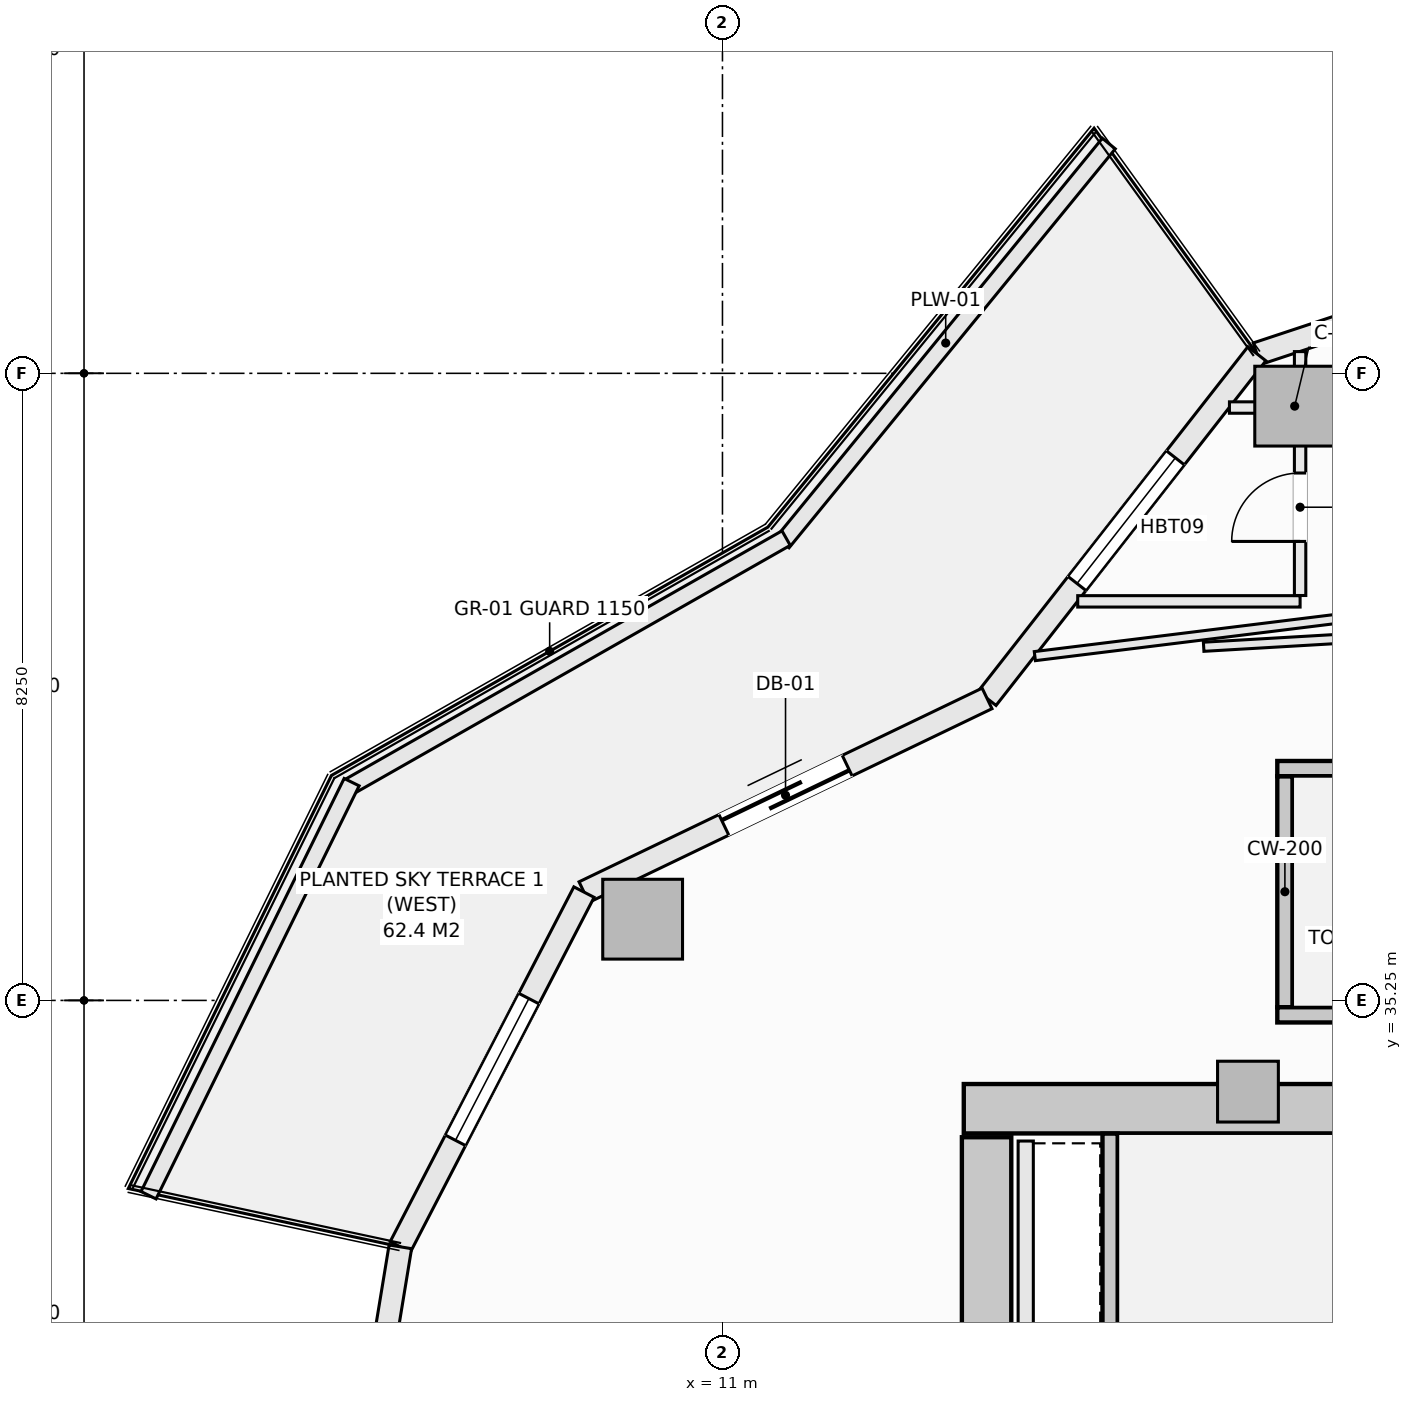
"""IFC4 building model, lengths in metres.
Left out: names, types, materials, properties, quantities, classifications, styles, units other than length and angle.
Written with IfcOpenShell. Run it as: python <this file> out.ifc"""

import sys

from ifc_helpers import new_model, si_unit, direction, frame, frame_2d, origin, origin_2d, place, context, subcontext, project, spatial, rectangle, extrude, element, fill, save


model = new_model("IFC4")
c1 = context("Model", 3, precision=1e-05, world=origin(), true_north=direction((0.0, 1.0)))
c2 = subcontext(c1, "Body", "Model", "MODEL_VIEW")
j1 = project(units=[si_unit("LENGTHUNIT", "METRE"), si_unit("PLANEANGLEUNIT", "RADIAN")], contexts=[c1])
p1 = place(None, origin())
s1 = spatial("IfcSite", under=j1, at=p1, CompositionType="ELEMENT")
p2 = place(p1, origin())
s2 = spatial("IfcBuilding", under=s1, at=p2, CompositionType="ELEMENT")
p3 = place(p2, frame((0.0, 0.0, 135.9)))
s3 = spatial("IfcBuildingStorey", under=s2, at=p3, CompositionType="ELEMENT", Elevation=135.9)
p4 = place(p3, frame((14.175, 33.825, -0.27), z_axis=(0.0, 0.0, 1.0), x_axis=(1.0, 0.0, 0.0)))
e1 = element("IfcWall", 1, at=p4, inside=s3, PredefinedType="SHEAR", context=c2, shape_type="SweptSolid", body=[
    extrude(rectangle(XDim=13.65, YDim=0.65, at=frame_2d((6.825, 0.0))), origin(), (0.0, 0.0, 1.0), 3.4),
])
p5 = place(p3, frame((14.475, 20.55, -0.27), z_axis=(0.0, 0.0, 1.0), x_axis=(0.0, 1.0, 0.0)))
e2 = element("IfcWall", 2, at=p5, inside=s3, PredefinedType="SHEAR", context=c2, shape_type="SweptSolid", body=[
    extrude(rectangle(XDim=12.9, YDim=0.65, at=frame_2d((6.45, 0.0))), origin(), (0.0, 0.0, 1.0), 3.4),
])
for number, where, z_axis, x_axis in (
    (3, (18.529, 43.068, -0.27), (0.0, 0.0, 1.0), (1.0, 0.0, 0.0)),
    (4, (9.95, 36.319, -0.27), (0.0, 0.0, 1.0), (1.0, 0.0, 0.0)),
):
    element("IfcColumn", number, at=place(p3, frame(where, z_axis=z_axis, x_axis=x_axis)), inside=s3, PredefinedType="COLUMN", context=c2, shape_type="SweptSolid", body=[
        extrude(rectangle(XDim=1.05, YDim=1.05, at=origin_2d()), origin(), (0.0, 0.0, 1.0), 3.4),
    ])
p6 = place(p3, frame((17.914, 34.05, -0.27), z_axis=(0.0, 0.0, 1.0), x_axis=(1.0, 0.0, 0.0)))
e5 = element("IfcColumn", 5, at=p6, inside=s3, PredefinedType="PILASTER", context=c2, shape_type="SweptSolid", body=[
    extrude(rectangle(XDim=0.8, YDim=0.8, at=origin_2d()), origin(), (0.0, 0.0, 1.0), 3.4),
])
p7 = place(p3, frame((18.031, 43.758, 0.0), z_axis=(0.0, 0.0, 1.0), x_axis=(0.949238009374, 0.314558741032, 0.0)))
e6 = element("IfcWall", 6, at=p7, inside=s3, PredefinedType="SOLIDWALL", context=c2, shape_type="SweptSolid", body=[
    extrude(rectangle(XDim=6.146, YDim=0.3, at=frame_2d((3.073, 0.0))), origin(), (0.0, 0.0, 1.0), 2.653),
])
p8 = place(p7, frame((2.023, 0.0, 0.74)))
e7 = element("IfcOpeningElement", 7, at=p8, cuts=e6, PredefinedType="OPENING", context=c2, shape_type="SweptSolid", body=[
    extrude(rectangle(XDim=2.1, YDim=1.7, at=frame_2d((1.05, 0.85))), frame((0.0, 0.16, 0.0), z_axis=(0.0, -1.0, 0.0), x_axis=(1.0, 0.0, 0.0)), (0.0, 0.0, 1.0), 0.32),
])
p9 = place(p3, frame((14.481, 39.223, 0.0), z_axis=(0.0, 0.0, 1.0), x_axis=(0.616435134162, 0.787405693001, 0.0)))
e8 = element("IfcWall", 8, at=p9, inside=s3, PredefinedType="SOLIDWALL", context=c2, shape_type="SweptSolid", body=[
    extrude(rectangle(XDim=5.759, YDim=0.3, at=frame_2d((2.879, 0.0))), origin(), (0.0, 0.0, 1.0), 2.653),
])
p10 = place(p9, frame((1.92, 0.0, 0.74)))
e9 = element("IfcOpeningElement", 9, at=p10, cuts=e8, PredefinedType="OPENING", context=c2, shape_type="SweptSolid", body=[
    extrude(rectangle(XDim=2.1, YDim=1.7, at=frame_2d((1.05, 0.85))), frame((0.0, 0.16, 0.0), z_axis=(0.0, -1.0, 0.0), x_axis=(1.0, 0.0, 0.0)), (0.0, 0.0, 1.0), 0.32),
])
p11 = place(p3, frame((9.178, 36.675, 0.0), z_axis=(0.0, 0.0, 1.0), x_axis=(0.901370184739, 0.433049408339, 0.0)))
e10 = element("IfcWall", 10, at=p11, inside=s3, PredefinedType="SOLIDWALL", context=c2, shape_type="SweptSolid", body=[
    extrude(rectangle(XDim=5.884, YDim=0.3, at=frame_2d((2.942, 0.0))), origin(), (0.0, 0.0, 1.0), 2.653),
])
p12 = place(p11, frame((2.042, 0.0, 0.0)))
e11 = element("IfcOpeningElement", 11, at=p12, cuts=e10, PredefinedType="OPENING", context=c2, shape_type="SweptSolid", body=[
    extrude(rectangle(XDim=1.8, YDim=2.25, at=frame_2d((0.9, 1.125))), frame((0.0, 0.16, 0.0), z_axis=(0.0, -1.0, 0.0), x_axis=(1.0, 0.0, 0.0)), (0.0, 0.0, 1.0), 0.32),
])
p13 = place(p3, frame((6.762, 32.008, 0.0), z_axis=(0.0, 0.0, 1.0), x_axis=(0.459767899643, 0.888039119892, 0.0)))
e12 = element("IfcWall", 12, at=p13, inside=s3, PredefinedType="SOLIDWALL", context=c2, shape_type="SweptSolid", body=[
    extrude(rectangle(XDim=5.255, YDim=0.3, at=frame_2d((2.628, 0.0))), origin(), (0.0, 0.0, 1.0), 2.653),
])
p14 = place(p13, frame((1.578, 0.0, 0.74)))
e13 = element("IfcOpeningElement", 13, at=p14, cuts=e12, PredefinedType="OPENING", context=c2, shape_type="SweptSolid", body=[
    extrude(rectangle(XDim=2.1, YDim=1.7, at=frame_2d((1.05, 0.85))), frame((0.0, 0.16, 0.0), z_axis=(0.0, -1.0, 0.0), x_axis=(1.0, 0.0, 0.0)), (0.0, 0.0, 1.0), 0.32),
])
p15 = place(p3, frame((5.938, 27.0, 0.0), z_axis=(0.0, 0.0, 1.0), x_axis=(0.162393944769, 0.986726003864, 0.0)))
e14 = element("IfcWall", 14, at=p15, inside=s3, PredefinedType="SOLIDWALL", context=c2, shape_type="SweptSolid", body=[
    extrude(rectangle(XDim=5.075, YDim=0.3, at=frame_2d((2.538, 0.0))), origin(), (0.0, 0.0, 1.0), 2.653),
])
p16 = place(p15, frame((1.488, 0.0, 0.74)))
e15 = element("IfcOpeningElement", 15, at=p16, cuts=e14, PredefinedType="OPENING", context=c2, shape_type="SweptSolid", body=[
    extrude(rectangle(XDim=2.1, YDim=1.7, at=frame_2d((1.05, 0.85))), frame((0.0, 0.16, 0.0), z_axis=(0.0, -1.0, 0.0), x_axis=(1.0, 0.0, 0.0)), (0.0, 0.0, 1.0), 0.32),
])
p17 = place(p3, frame((11.791, 41.274, 0.0), z_axis=(0.0, 0.0, 1.0), x_axis=(0.633024046468, 0.774132131224, 0.0)))
e16 = element("IfcWall", 16, at=p17, inside=s3, PredefinedType="PARAPET", context=c2, shape_type="SweptSolid", body=[
    extrude(rectangle(XDim=6.781, YDim=0.22, at=frame_2d((3.39, 0.0))), origin(), (0.0, 0.0, 1.0), 0.52),
])
p18 = place(p3, frame((6.095, 38.066, 0.0), z_axis=(0.0, 0.0, 1.0), x_axis=(0.869187658335, 0.494482370361, 0.0)))
e17 = element("IfcWall", 17, at=p18, inside=s3, PredefinedType="PARAPET", context=c2, shape_type="SweptSolid", body=[
    extrude(rectangle(XDim=6.606, YDim=0.22, at=frame_2d((3.303, 0.0))), origin(), (0.0, 0.0, 1.0), 0.52),
])
p19 = place(p3, frame((3.449, 32.687, 0.0), z_axis=(0.0, 0.0, 1.0), x_axis=(0.441269631716, 0.897374566235, 0.0)))
e18 = element("IfcWall", 18, at=p19, inside=s3, PredefinedType="PARAPET", context=c2, shape_type="SweptSolid", body=[
    extrude(rectangle(XDim=6.056, YDim=0.22, at=frame_2d((3.028, 0.0))), origin(), (0.0, 0.0, 1.0), 0.52),
])
p20 = place(p3, frame((16.1, 30.462, -0.27), z_axis=(0.0, 0.0, 1.0), x_axis=(0.0, 1.0, 0.0)))
e19 = element("IfcWall", 19, at=p20, inside=s3, PredefinedType="SHEAR", context=c2, shape_type="SweptSolid", body=[
    extrude(rectangle(XDim=3.036, YDim=0.2, at=frame_2d((1.518, 0.0))), origin(), (0.0, 0.0, 1.0), 3.4),
])
p21 = place(p3, frame((18.4, 35.16, -0.27), z_axis=(0.0, 0.0, 1.0), x_axis=(0.0, 1.0, 0.0)))
e20 = element("IfcWall", 20, at=p21, inside=s3, PredefinedType="SHEAR", context=c2, shape_type="SweptSolid", body=[
    extrude(rectangle(XDim=3.04, YDim=0.2, at=frame_2d((1.52, 0.0))), origin(), (0.0, 0.0, 1.0), 3.4),
])
for number, where, z_axis, x_axis in (
    (21, (18.3, 38.3, -0.27), (0.0, 0.0, 1.0), (1.0, 0.0, 0.0)),
    (22, (18.3, 35.06, -0.27), (0.0, 0.0, 1.0), (1.0, 0.0, 0.0)),
):
    element("IfcWall", number, at=place(p3, frame(where, z_axis=z_axis, x_axis=x_axis)), inside=s3, PredefinedType="SHEAR", context=c2, shape_type="SweptSolid", body=[
        extrude(rectangle(XDim=8.95, YDim=0.2, at=frame_2d((4.475, 0.0))), origin(), (0.0, 0.0, 1.0), 3.4),
    ])
p22 = place(p3, frame((14.99, 30.55, 0.0), z_axis=(0.0, 0.0, 1.0), x_axis=(0.0, 1.0, 0.0)))
e23 = element("IfcWall", 23, at=p22, inside=s3, PredefinedType="SOLIDWALL", context=c2, shape_type="SweptSolid", body=[
    extrude(rectangle(XDim=2.85, YDim=0.2, at=frame_2d((1.425, 0.0))), origin(), (0.0, 0.0, 1.0), 3.13),
])
p23 = place(p3, frame((15.674, 40.5, 0.0), z_axis=(0.0, 0.0, 1.0), x_axis=(1.0, 0.0, 0.0)))
e24 = element("IfcWall", 24, at=p23, inside=s3, PredefinedType="PARTITIONING", context=c2, shape_type="SweptSolid", body=[
    extrude(rectangle(XDim=2.926, YDim=0.15, at=frame_2d((1.463, 0.0))), origin(), (0.0, 0.0, 1.0), 3.13),
])
p24 = place(p3, frame((18.6, 40.577, 0.0), z_axis=(0.0, 0.0, 1.0), x_axis=(0.0, 1.0, 0.0)))
e25 = element("IfcWall", 25, at=p24, inside=s3, PredefinedType="PARTITIONING", context=c2, shape_type="SweptSolid", body=[
    extrude(rectangle(XDim=3.209, YDim=0.15, at=frame_2d((1.604, 0.0))), origin(), (0.0, 0.0, 1.0), 2.505),
])
p25 = place(p24, frame((0.711, 0.0, 0.0)))
e26 = element("IfcOpeningElement", 26, at=p25, cuts=e25, PredefinedType="OPENING", context=c2, shape_type="SweptSolid", body=[
    extrude(rectangle(XDim=0.9, YDim=2.1, at=frame_2d((0.45, 1.05))), frame((0.0, 0.085, 0.0), z_axis=(0.0, -1.0, 0.0), x_axis=(1.0, 0.0, 0.0)), (0.0, 0.0, 1.0), 0.17),
])
p26 = place(p3, frame((17.67, 43.05, 0.0), z_axis=(0.0, 0.0, 1.0), x_axis=(1.0, 0.0, 0.0)))
e27 = element("IfcWall", 27, at=p26, inside=s3, PredefinedType="PARTITIONING", context=c2, shape_type="SweptSolid", body=[
    extrude(rectangle(XDim=0.853, YDim=0.15, at=frame_2d((0.426, 0.0))), origin(), (0.0, 0.0, 1.0), 2.653),
])
p27 = place(p3, frame((15.11, 39.78, 0.0), z_axis=(0.0, 0.0, 1.0), x_axis=(0.992465524728, 0.122524210773, 0.0)))
e28 = element("IfcWall", 28, at=p27, inside=s3, PredefinedType="PARTITIONING", context=c2, shape_type="SweptSolid", body=[
    extrude(rectangle(XDim=6.287, YDim=0.12, at=frame_2d((3.143, 0.0))), origin(), (0.0, 0.0, 1.0), 3.13),
])
p28 = place(p3, frame((17.331, 39.903, 0.0), z_axis=(0.0, 0.0, 1.0), x_axis=(0.998298083041, 0.0583175565, 0.0)))
e29 = element("IfcWall", 29, at=p28, inside=s3, PredefinedType="PARTITIONING", context=c2, shape_type="SweptSolid", body=[
    extrude(rectangle(XDim=8.528, YDim=0.12, at=frame_2d((4.264, 0.0))), origin(), (0.0, 0.0, 1.0), 3.13),
])
p29 = place(p10, origin())
e30 = element("IfcWindow", 30, at=p29, inside=s3, PartitioningType="SINGLE_PANEL", PredefinedType="WINDOW", context=c2, shape_type="SweptSolid", body=[
    extrude(rectangle(XDim=2.1, YDim=1.7, at=frame_2d((1.05, 0.85))), frame((0.0, 0.03, 0.0), z_axis=(0.0, -1.0, 0.0), x_axis=(1.0, 0.0, 0.0)), (0.0, 0.0, 1.0), 0.06),
])
fill(e9, e30)
p30 = place(p12, origin())
e31 = element("IfcDoor", 31, at=p30, inside=s3, OperationType="SLIDING_TO_LEFT", PredefinedType="DOOR", context=c2, shape_type="SweptSolid", body=[
    extrude(rectangle(XDim=1.8, YDim=2.25, at=frame_2d((0.9, 1.125))), frame((0.0, 0.025, 0.0), z_axis=(0.0, -1.0, 0.0), x_axis=(1.0, 0.0, 0.0)), (0.0, 0.0, 1.0), 0.05),
])
fill(e11, e31)
p31 = place(p14, origin())
e32 = element("IfcWindow", 32, at=p31, inside=s3, PartitioningType="SINGLE_PANEL", PredefinedType="WINDOW", context=c2, shape_type="SweptSolid", body=[
    extrude(rectangle(XDim=2.1, YDim=1.7, at=frame_2d((1.05, 0.85))), frame((0.0, 0.03, 0.0), z_axis=(0.0, -1.0, 0.0), x_axis=(1.0, 0.0, 0.0)), (0.0, 0.0, 1.0), 0.06),
])
fill(e13, e32)
p32 = place(p25, origin())
e33 = element("IfcDoor", 33, at=p32, inside=s3, OperationType="SINGLE_SWING_LEFT", PredefinedType="DOOR", context=c2, shape_type="SweptSolid", body=[
    extrude(rectangle(XDim=0.9, YDim=2.1, at=frame_2d((0.45, 1.05))), frame((0.0, 0.025, 0.0), z_axis=(0.0, -1.0, 0.0), x_axis=(1.0, 0.0, 0.0)), (0.0, 0.0, 1.0), 0.05),
])
fill(e26, e33)
save(model, sys.argv[1])
